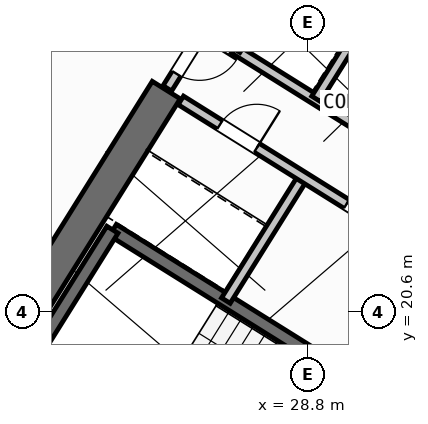
"""IFC4 building model, lengths in metres.
Left out: names, types, materials, properties, quantities, classifications, styles, units other than length and angle.
Written with IfcOpenShell. Run it as: python <this file> out.ifc"""

import sys

from ifc_helpers import new_model, si_unit, direction, frame, frame_2d, origin, place, context, subcontext, project, spatial, rectangle, extrude, source, transform, mapped, element, fill, save


model = new_model("IFC4")
c1 = context("Model", 3, precision=1e-05, world=origin(), true_north=direction((0.0, 1.0)))
c2 = subcontext(c1, "Body", "Model", "MODEL_VIEW")
j1 = project(units=[si_unit("LENGTHUNIT", "METRE"), si_unit("PLANEANGLEUNIT", "RADIAN")], contexts=[c1])
p1 = place(None, origin())
s1 = spatial("IfcSite", under=j1, at=p1, CompositionType="ELEMENT")
p2 = place(p1, origin())
s2 = spatial("IfcBuilding", under=s1, at=p2, CompositionType="ELEMENT")
p3 = place(p2, frame((0.0, 0.0, 76.5)))
s3 = spatial("IfcBuildingStorey", under=s2, at=p3, CompositionType="ELEMENT", Elevation=76.5)
p4 = place(p3, frame((40.615, 23.983, 0.0), z_axis=(0.0, 0.0, 1.0), x_axis=(-0.848045953968, 0.529922692436, 0.0)))
e1 = element("IfcWall", 1, at=p4, inside=s3, PredefinedType="SHEAR", context=c2, shape_type="SweptSolid", body=[
    extrude(rectangle(XDim=13.24, YDim=0.65, at=frame_2d((6.62, 0.0))), origin(), (0.0, 0.0, 1.0), 4.25),
])
p5 = place(p3, frame((26.007, 24.976, 0.0), z_axis=(0.0, 0.0, 1.0), x_axis=(-0.529916319127, -0.848049936456, 0.0)))
e2 = element("IfcWall", 2, at=p5, inside=s3, PredefinedType="SHEAR", context=c2, shape_type="SweptSolid", body=[
    extrude(rectangle(XDim=6.375, YDim=0.65, at=frame_2d((3.188, 0.0))), origin(), (0.0, 0.0, 1.0), 4.25),
])
p6 = place(p3, frame((31.76, 12.183, 0.0), z_axis=(0.0, 0.0, 1.0), x_axis=(-0.848047074256, 0.529920899612, 0.0)))
e3 = element("IfcWall", 3, at=p6, inside=s3, PredefinedType="STANDARD", context=c2, shape_type="SweptSolid", body=[
    extrude(rectangle(XDim=30.652, YDim=0.32, at=frame_2d((15.326, 0.0))), origin(), (0.0, 0.0, 1.0), 4.25),
])
p7 = place(p6, frame((14.878, 0.0, 0.0)))
e4 = element("IfcOpeningElement", 4, at=p7, cuts=e3, PredefinedType="OPENING", context=c2, shape_type="SweptSolid", body=[
    extrude(rectangle(XDim=1.2, YDim=2.15, at=frame_2d((0.6, 1.075))), frame((0.0, 0.17, 0.0), z_axis=(0.0, -1.0, 0.0), x_axis=(1.0, 0.0, 0.0)), (0.0, 0.0, 1.0), 0.34),
])
p8 = place(p6, frame((1.74, 0.0, 0.7)))
e5 = element("IfcOpeningElement", 5, at=p8, cuts=e3, PredefinedType="OPENING", context=c2, shape_type="SweptSolid", body=[
    extrude(rectangle(XDim=2.6, YDim=2.0, at=frame_2d((1.3, 1.0))), frame((0.0, 0.17, 0.0), z_axis=(0.0, -1.0, 0.0), x_axis=(1.0, 0.0, 0.0)), (0.0, 0.0, 1.0), 0.34),
])
p9 = place(p6, frame((6.919, 0.0, 0.7)))
e6 = element("IfcOpeningElement", 6, at=p9, cuts=e3, PredefinedType="OPENING", context=c2, shape_type="SweptSolid", body=[
    extrude(rectangle(XDim=2.6, YDim=2.0, at=frame_2d((1.3, 1.0))), frame((0.0, 0.17, 0.0), z_axis=(0.0, -1.0, 0.0), x_axis=(1.0, 0.0, 0.0)), (0.0, 0.0, 1.0), 0.34),
])
p10 = place(p6, frame((19.451, 0.0, 0.85)))
e7 = element("IfcOpeningElement", 7, at=p10, cuts=e3, PredefinedType="OPENING", context=c2, shape_type="SweptSolid", body=[
    extrude(rectangle(XDim=1.6, YDim=1.8, at=frame_2d((0.8, 0.9))), frame((0.0, 0.17, 0.0), z_axis=(0.0, -1.0, 0.0), x_axis=(1.0, 0.0, 0.0)), (0.0, 0.0, 1.0), 0.34),
])
p11 = place(p6, frame((26.358, 0.0, 0.7)))
e8 = element("IfcOpeningElement", 8, at=p11, cuts=e3, PredefinedType="OPENING", context=c2, shape_type="SweptSolid", body=[
    extrude(rectangle(XDim=2.6, YDim=2.0, at=frame_2d((1.3, 1.0))), frame((0.0, 0.17, 0.0), z_axis=(0.0, -1.0, 0.0), x_axis=(1.0, 0.0, 0.0)), (0.0, 0.0, 1.0), 0.34),
])
p12 = place(p3, frame((31.28, 18.261, 0.0), z_axis=(0.0, 0.0, 1.0), x_axis=(-0.848051618787, 0.529913626805, 0.0)))
e9 = element("IfcWall", 9, at=p12, inside=s3, PredefinedType="SHEAR", context=c2, shape_type="SweptSolid", body=[
    extrude(rectangle(XDim=7.46, YDim=0.26, at=frame_2d((3.73, 0.0))), origin(), (0.0, 0.0, 1.0), 4.25),
])
p13 = place(p12, frame((0.36, 0.0, 0.0)))
e10 = element("IfcOpeningElement", 10, at=p13, cuts=e9, PredefinedType="OPENING", context=c2, shape_type="SweptSolid", body=[
    extrude(rectangle(XDim=0.86, YDim=2.05, at=frame_2d((0.43, 1.025))), frame((0.0, 0.14, 0.0), z_axis=(0.0, -1.0, 0.0), x_axis=(1.0, 0.0, 0.0)), (0.0, 0.0, 1.0), 0.28),
])
p14 = place(p3, frame((24.945, 22.22, 0.0), z_axis=(0.0, 0.0, 1.0), x_axis=(-0.529908658664, -0.84805472316, 0.0)))
e11 = element("IfcWall", 11, at=p14, inside=s3, PredefinedType="SHEAR", context=c2, shape_type="SweptSolid", body=[
    extrude(rectangle(XDim=3.16, YDim=0.26, at=frame_2d((1.58, 0.0))), origin(), (0.0, 0.0, 1.0), 4.25),
])
p15 = place(p3, frame((31.822, 24.998, 0.0), z_axis=(0.0, 0.0, 1.0), x_axis=(-0.848058348634, 0.529902856485, 0.0)))
e12 = element("IfcWall", 12, at=p15, inside=s3, PredefinedType="STANDARD", context=c2, shape_type="SweptSolid", body=[
    extrude(rectangle(XDim=4.568, YDim=0.2, at=frame_2d((2.284, 0.0))), origin(), (0.0, 0.0, 1.0), 4.24),
])
p16 = place(p3, frame((32.108, 22.814, 0.0), z_axis=(0.0, 0.0, 1.0), x_axis=(-0.848042229521, 0.529928652696, 0.0)))
e13 = element("IfcWall", 13, at=p16, inside=s3, PredefinedType="STANDARD", context=c2, shape_type="SweptSolid", body=[
    extrude(rectangle(XDim=5.62, YDim=0.2, at=frame_2d((2.81, 0.0))), origin(), (0.0, 0.0, 1.0), 4.24),
])
p17 = place(p3, frame((28.25, 27.17, 0.0), z_axis=(0.0, 0.0, 1.0), x_axis=(-0.529905827651, -0.848056492117, 0.0)))
e14 = element("IfcWall", 14, at=p17, inside=s3, PredefinedType="STANDARD", context=c2, shape_type="SweptSolid", body=[
    extrude(rectangle(XDim=1.65, YDim=0.2, at=frame_2d((0.825, 0.0))), origin(), (0.0, 0.0, 1.0), 4.24),
])
p18 = place(p3, frame((29.801, 26.142, 0.0), z_axis=(0.0, 0.0, 1.0), x_axis=(-0.529998940003, -0.847998304005, 0.0)))
e15 = element("IfcWall", 15, at=p18, inside=s3, PredefinedType="STANDARD", context=c2, shape_type="SweptSolid", body=[
    extrude(rectangle(XDim=1.58, YDim=0.2, at=frame_2d((0.79, 0.0))), origin(), (0.0, 0.0, 1.0), 4.24),
])
p19 = place(p3, frame((28.71, 23.263, 0.0), z_axis=(0.0, 0.0, 1.0), x_axis=(-0.529907497854, -0.848055448493, 0.0)))
e16 = element("IfcWall", 16, at=p19, inside=s3, PredefinedType="STANDARD", context=c2, shape_type="SweptSolid", body=[
    extrude(rectangle(XDim=2.88, YDim=0.2, at=frame_2d((1.44, 0.0))), origin(), (0.0, 0.0, 1.0), 4.24),
])
p20 = place(p3, frame((31.525, 21.504, 0.0), z_axis=(0.0, 0.0, 1.0), x_axis=(-0.848044998614, 0.529924221305, 0.0)))
e17 = element("IfcWall", 17, at=p20, inside=s3, PredefinedType="STANDARD", context=c2, shape_type="SweptSolid", body=[
    extrude(rectangle(XDim=6.168, YDim=0.2, at=frame_2d((3.084, 0.0))), origin(), (0.0, 0.0, 1.0), 4.24),
])
p21 = place(p20, frame((4.4, 0.0, 0.0)))
e18 = element("IfcOpeningElement", 18, at=p21, cuts=e17, PredefinedType="OPENING", context=c2, shape_type="SweptSolid", body=[
    extrude(rectangle(XDim=0.86, YDim=2.05, at=frame_2d((0.43, 1.025))), frame((0.0, 0.11, 0.0), z_axis=(0.0, -1.0, 0.0), x_axis=(1.0, 0.0, 0.0)), (0.0, 0.0, 1.0), 0.22),
])
p22 = place(p20, frame((1.45, 0.0, 0.0)))
e19 = element("IfcOpeningElement", 19, at=p22, cuts=e17, PredefinedType="OPENING", context=c2, shape_type="SweptSolid", body=[
    extrude(rectangle(XDim=0.86, YDim=2.05, at=frame_2d((0.43, 1.025))), frame((0.0, 0.11, 0.0), z_axis=(0.0, -1.0, 0.0), x_axis=(1.0, 0.0, 0.0)), (0.0, 0.0, 1.0), 0.22),
])
p23 = place(p3, frame((27.596, 27.52, 0.0), z_axis=(0.0, 0.0, 1.0), x_axis=(-0.529865479138, -0.848081702443, 0.0)))
e20 = element("IfcWall", 20, at=p23, inside=s3, PredefinedType="STANDARD", context=c2, shape_type="SweptSolid", body=[
    extrude(rectangle(XDim=2.96, YDim=0.2, at=frame_2d((1.48, 0.0))), origin(), (0.0, 0.0, 1.0), 4.24),
])
p24 = place(p23, frame((1.76, 0.0, 0.0)))
e21 = element("IfcOpeningElement", 21, at=p24, cuts=e20, PredefinedType="OPENING", context=c2, shape_type="SweptSolid", body=[
    extrude(rectangle(XDim=0.86, YDim=2.05, at=frame_2d((0.43, 1.025))), frame((0.0, 0.11, 0.0), z_axis=(0.0, -1.0, 0.0), x_axis=(1.0, 0.0, 0.0)), (0.0, 0.0, 1.0), 0.22),
])
p25 = place(p3, frame((31.239, 38.274, 0.0), z_axis=(0.0, 0.0, 1.0), x_axis=(-0.529921796515, -0.848046513806, 0.0)))
e22 = element("IfcWall", 22, at=p25, inside=s3, PredefinedType="PARTITIONING", context=c2, shape_type="SweptSolid", body=[
    extrude(rectangle(XDim=16.5, YDim=0.16, at=frame_2d((8.25, 0.0))), origin(), (0.0, 0.0, 1.0), 4.24),
])
m1 = source(origin(), c2, "Body", "SweptSolid", [
    extrude(rectangle(XDim=0.86, YDim=2.05, at=frame_2d((0.43, 1.025))), frame((0.0, 0.025, 0.0), z_axis=(0.0, -1.0, 0.0), x_axis=(1.0, 0.0, 0.0)), (0.0, 0.0, 1.0), 0.05),
])
p26 = place(p21, frame((0.86, 0.0, 0.0), z_axis=(0.0, 0.0, 1.0), x_axis=(-1.0, 0.0, 0.0)))
e23 = element("IfcDoor", 23, at=p26, inside=s3, OperationType="SINGLE_SWING_RIGHT", PredefinedType="DOOR", context=c2, shape_type="MappedRepresentation", body=[
    mapped(m1, transform((0.0, 0.0, 0.0), scale=1.0)),
])
fill(e18, e23)
p27 = place(p22, frame((0.86, 0.0, 0.0), z_axis=(0.0, 0.0, 1.0), x_axis=(-1.0, 0.0, 0.0)))
e24 = element("IfcDoor", 24, at=p27, inside=s3, OperationType="SINGLE_SWING_LEFT", PredefinedType="DOOR", context=c2, shape_type="MappedRepresentation", body=[
    mapped(m1, transform((0.0, 0.0, 0.0), scale=1.0)),
])
fill(e19, e24)
p28 = place(p24, origin())
e25 = element("IfcDoor", 25, at=p28, inside=s3, OperationType="SINGLE_SWING_LEFT", PredefinedType="DOOR", context=c2, shape_type="MappedRepresentation", body=[
    mapped(m1, transform((0.0, 0.0, 0.0), scale=1.0)),
])
fill(e21, e25)
save(model, sys.argv[1])
